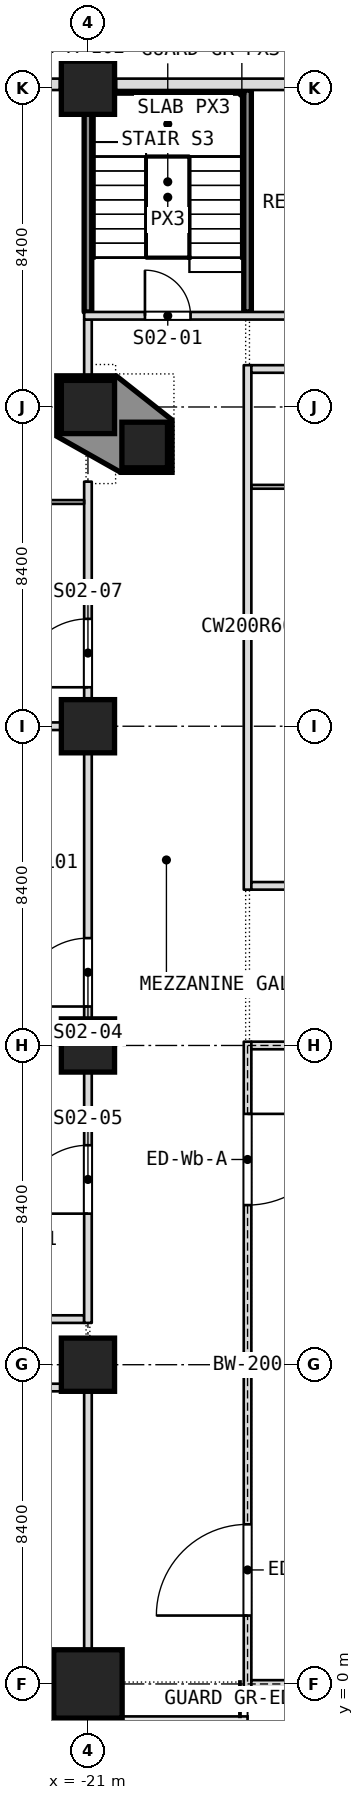
"""IFC4 building model, lengths in metres.
Left out: names, types, materials, properties, quantities, classifications, styles, units other than length and angle.
Written with IfcOpenShell. Run it as: python <this file> out.ifc"""

import sys

from ifc_helpers import new_model, si_unit, direction, frame, frame_2d, origin, origin_2d, place, context, subcontext, project, spatial, polyline, rectangle, outline, extrude, element, fill, save


model = new_model("IFC4")
c1 = context("Model", 3, precision=1e-05, world=origin(), true_north=direction((0.0, 1.0)))
c2 = subcontext(c1, "Body", "Model", "MODEL_VIEW")
j1 = project(units=[si_unit("LENGTHUNIT", "METRE"), si_unit("PLANEANGLEUNIT", "RADIAN")], contexts=[c1])
p1 = place(None, origin())
s1 = spatial("IfcSite", under=j1, at=p1, CompositionType="ELEMENT")
p2 = place(p1, origin())
s2 = spatial("IfcBuilding", under=s1, at=p2, CompositionType="ELEMENT")
p3 = place(p2, frame((0.0, 0.0, 8.0)))
s3 = spatial("IfcBuildingStorey", under=s2, at=p3, CompositionType="ELEMENT", Elevation=8.0)
p4 = place(p3, frame((-21.0, 0.0, 0.0), z_axis=(0.0, 0.0, 1.0), x_axis=(1.0, 0.0, 0.0)))
e1 = element("IfcColumn", 1, at=p4, inside=s3, PredefinedType="COLUMN", context=c2, shape_type="SweptSolid", body=[
    extrude(rectangle(XDim=1.8, YDim=1.8, at=origin_2d()), origin(), (0.0, 0.0, 1.0), 5.0),
])
for number, where, z_axis, x_axis in (
    (2, (-21.0, 8.4, 0.0), (0.0, 0.0, 1.0), (1.0, 0.0, 0.0)),
    (3, (-21.0, 16.8, 0.0), (0.0, 0.0, 1.0), (1.0, 0.0, 0.0)),
    (4, (-21.0, 25.2, 0.0), (0.0, 0.0, 1.0), (1.0, 0.0, 0.0)),
    (5, (-21.0, 33.6, 0.0), (0.0, 0.0, 1.0), (1.0, 0.0, 0.0)),
    (6, (-21.0, 42.0, 0.0), (0.0, 0.0, 1.0), (1.0, 0.0, 0.0)),
):
    element("IfcColumn", number, at=place(p3, frame(where, z_axis=z_axis, x_axis=x_axis)), inside=s3, PredefinedType="COLUMN", context=c2, shape_type="SweptSolid", body=[
        extrude(rectangle(XDim=1.4, YDim=1.4, at=origin_2d()), origin(), (0.0, 0.0, 1.0), 5.0),
    ])
p5 = place(p3, frame((-19.507, 32.6, 0.0), z_axis=(0.0, 0.0, 1.0), x_axis=(1.0, 0.0, 0.0)))
e7 = element("IfcColumn", 7, at=p5, inside=s3, PredefinedType="COLUMN", context=c2, shape_type="SweptSolid", body=[
    extrude(rectangle(XDim=1.2, YDim=1.2, at=origin_2d()), origin(), (0.0, 0.0, 1.0), 5.0),
])
p6 = place(p3, frame((-38.1, 7.8, 0.0), z_axis=(0.0, 0.0, 1.0), x_axis=(1.0, 0.0, 0.0)))
e8 = element("IfcWall", 8, at=p6, inside=s3, PredefinedType="PARTITIONING", context=c2, shape_type="SweptSolid", body=[
    extrude(rectangle(XDim=17.0, YDim=0.2, at=frame_2d((8.5, 0.0))), origin(), (0.0, 0.0, 1.0), 4.68),
])
p7 = place(p6, frame((6.5, 0.0, 0.0)))
e9 = element("IfcOpeningElement", 9, at=p7, cuts=e8, PredefinedType="OPENING", context=c2, shape_type="SweptSolid", body=[
    extrude(rectangle(XDim=1.8, YDim=2.1, at=frame_2d((0.9, 1.05))), frame((0.0, 0.1, 0.0), z_axis=(0.0, -1.0, 0.0), x_axis=(1.0, 0.0, 0.0)), (0.0, 0.0, 1.0), 0.2),
])
p8 = place(p3, frame((-27.3, 9.6, 0.0), z_axis=(0.0, 0.0, 1.0), x_axis=(1.0, 0.0, 0.0)))
e10 = element("IfcWall", 10, at=p8, inside=s3, PredefinedType="PARTITIONING", context=c2, shape_type="SweptSolid", body=[
    extrude(rectangle(XDim=6.2, YDim=0.2, at=frame_2d((3.1, 0.0))), origin(), (0.0, 0.0, 1.0), 4.68),
])
p9 = place(p3, frame((-16.8, 20.9, 0.0), z_axis=(0.0, 0.0, 1.0), x_axis=(0.0, 1.0, 0.0)))
e11 = element("IfcWall", 11, at=p9, inside=s3, PredefinedType="PARTITIONING", context=c2, shape_type="SweptSolid", body=[
    extrude(rectangle(XDim=13.8, YDim=0.2, at=frame_2d((6.9, 0.0))), origin(), (0.0, 0.0, 1.0), 4.68),
])
p10 = place(p3, frame((-16.8, 36.1, 0.0), z_axis=(0.0, 0.0, 1.0), x_axis=(0.0, 1.0, 0.0)))
e12 = element("IfcWall", 12, at=p10, inside=s3, PredefinedType="PARTITIONING", context=c2, shape_type="SweptSolid", body=[
    extrude(rectangle(XDim=5.84, YDim=0.2, at=frame_2d((2.92, 0.0))), origin(), (0.0, 0.0, 1.0), 4.68),
])
p11 = place(p3, frame((-27.66, 17.0, 0.0), z_axis=(0.0, 0.0, 1.0), x_axis=(1.0, 0.0, 0.0)))
e13 = element("IfcWall", 13, at=p11, inside=s3, PredefinedType="PARTITIONING", context=c2, shape_type="SweptSolid", body=[
    extrude(rectangle(XDim=6.56, YDim=0.1, at=frame_2d((3.28, 0.0))), origin(), (0.0, 0.0, 1.0), 4.68),
])
p12 = place(p11, frame((2.38, 0.0, 0.0)))
e14 = element("IfcOpeningElement", 14, at=p12, cuts=e13, PredefinedType="OPENING", context=c2, shape_type="SweptSolid", body=[
    extrude(rectangle(XDim=1.8, YDim=2.1, at=frame_2d((0.9, 1.05))), frame((0.0, 0.05, 0.0), z_axis=(0.0, -1.0, 0.0), x_axis=(1.0, 0.0, 0.0)), (0.0, 0.0, 1.0), 0.1),
])
p13 = place(p3, frame((-21.0, -0.894, 0.0), z_axis=(0.0, 0.0, 1.0), x_axis=(0.0, 1.0, 0.0)))
e15 = element("IfcWall", 15, at=p13, inside=s3, PredefinedType="PARTITIONING", context=c2, shape_type="SweptSolid", body=[
    extrude(rectangle(XDim=8.794, YDim=0.2, at=frame_2d((4.397, 0.0))), origin(), (0.0, 0.0, 1.0), 4.68),
])
p14 = place(p3, frame((-21.0, 9.5, 0.0), z_axis=(0.0, 0.0, 1.0), x_axis=(0.0, 1.0, 0.0)))
e16 = element("IfcWall", 16, at=p14, inside=s3, PredefinedType="PARTITIONING", context=c2, shape_type="SweptSolid", body=[
    extrude(rectangle(XDim=22.135, YDim=0.2, at=frame_2d((11.067, 0.0))), origin(), (0.0, 0.0, 1.0), 4.68),
])
p15 = place(p14, frame((8.325, 0.0, 0.0)))
e17 = element("IfcOpeningElement", 17, at=p15, cuts=e16, PredefinedType="OPENING", context=c2, shape_type="SweptSolid", body=[
    extrude(rectangle(XDim=1.8, YDim=2.1, at=frame_2d((0.9, 1.05))), frame((0.0, 0.1, 0.0), z_axis=(0.0, -1.0, 0.0), x_axis=(1.0, 0.0, 0.0)), (0.0, 0.0, 1.0), 0.2),
])
p16 = place(p14, frame((2.875, 0.0, 0.0)))
e18 = element("IfcOpeningElement", 18, at=p16, cuts=e16, PredefinedType="OPENING", context=c2, shape_type="SweptSolid", body=[
    extrude(rectangle(XDim=1.8, YDim=2.1, at=frame_2d((0.9, 1.05))), frame((0.0, 0.1, 0.0), z_axis=(0.0, -1.0, 0.0), x_axis=(1.0, 0.0, 0.0)), (0.0, 0.0, 1.0), 0.2),
])
p17 = place(p14, frame((16.725, 0.0, 0.0)))
e19 = element("IfcOpeningElement", 19, at=p17, cuts=e16, PredefinedType="OPENING", context=c2, shape_type="SweptSolid", body=[
    extrude(rectangle(XDim=1.8, YDim=2.1, at=frame_2d((0.9, 1.05))), frame((0.0, 0.1, 0.0), z_axis=(0.0, -1.0, 0.0), x_axis=(1.0, 0.0, 0.0)), (0.0, 0.0, 1.0), 0.2),
])
p18 = place(p3, frame((-21.0, 34.42, 0.0), z_axis=(0.0, 0.0, 1.0), x_axis=(0.0, 1.0, 0.0)))
e20 = element("IfcWall", 20, at=p18, inside=s3, PredefinedType="PARTITIONING", context=c2, shape_type="SweptSolid", body=[
    extrude(rectangle(XDim=1.48, YDim=0.2, at=frame_2d((0.74, 0.0))), origin(), (0.0, 0.0, 1.0), 4.68),
])
p19 = place(p3, frame((-21.0, 36.1, 0.0), z_axis=(0.0, 0.0, 1.0), x_axis=(0.0, 1.0, 0.0)))
e21 = element("IfcWall", 21, at=p19, inside=s3, PredefinedType="PARTITIONING", context=c2, shape_type="SweptSolid", body=[
    extrude(rectangle(XDim=6.2, YDim=0.2, at=frame_2d((3.1, 0.0))), origin(), (0.0, 0.0, 1.0), 4.68),
])
p20 = place(p3, frame((-16.7, 21.0, 0.0), z_axis=(0.0, 0.0, 1.0), x_axis=(1.0, 0.0, 0.0)))
e22 = element("IfcWall", 22, at=p20, inside=s3, PredefinedType="PARTITIONING", context=c2, shape_type="SweptSolid", body=[
    extrude(rectangle(XDim=33.4, YDim=0.2, at=frame_2d((16.7, 0.0))), origin(), (0.0, 0.0, 1.0), 4.68),
])
p21 = place(p20, frame((7.425, 0.0, 0.0)))
e23 = element("IfcOpeningElement", 23, at=p21, cuts=e22, PredefinedType="OPENING", context=c2, shape_type="SweptSolid", body=[
    extrude(rectangle(XDim=1.8, YDim=2.1, at=frame_2d((0.9, 1.05))), frame((0.0, 0.1, 0.0), z_axis=(0.0, -1.0, 0.0), x_axis=(1.0, 0.0, 0.0)), (0.0, 0.0, 1.0), 0.2),
])
p22 = place(p20, frame((1.175, 0.0, 0.0)))
e24 = element("IfcOpeningElement", 24, at=p22, cuts=e22, PredefinedType="OPENING", context=c2, shape_type="SweptSolid", body=[
    extrude(rectangle(XDim=1.8, YDim=2.1, at=frame_2d((0.9, 1.05))), frame((0.0, 0.1, 0.0), z_axis=(0.0, -1.0, 0.0), x_axis=(1.0, 0.0, 0.0)), (0.0, 0.0, 1.0), 0.2),
])
p23 = place(p20, frame((15.8, 0.0, 0.0)))
e25 = element("IfcOpeningElement", 25, at=p23, cuts=e22, PredefinedType="OPENING", context=c2, shape_type="SweptSolid", body=[
    extrude(rectangle(XDim=1.8, YDim=2.1, at=frame_2d((0.9, 1.05))), frame((0.0, 0.1, 0.0), z_axis=(0.0, -1.0, 0.0), x_axis=(1.0, 0.0, 0.0)), (0.0, 0.0, 1.0), 0.2),
])
p24 = place(p20, frame((26.2, 0.0, 0.0)))
e26 = element("IfcOpeningElement", 26, at=p24, cuts=e22, PredefinedType="OPENING", context=c2, shape_type="SweptSolid", body=[
    extrude(rectangle(XDim=1.8, YDim=2.1, at=frame_2d((0.9, 1.05))), frame((0.0, 0.1, 0.0), z_axis=(0.0, -1.0, 0.0), x_axis=(1.0, 0.0, 0.0)), (0.0, 0.0, 1.0), 0.2),
])
p25 = place(p3, frame((-27.68, 25.2, 0.0), z_axis=(0.0, 0.0, 1.0), x_axis=(1.0, 0.0, 0.0)))
e27 = element("IfcWall", 27, at=p25, inside=s3, PredefinedType="PARTITIONING", context=c2, shape_type="SweptSolid", body=[
    extrude(rectangle(XDim=6.58, YDim=0.2, at=frame_2d((3.29, 0.0))), origin(), (0.0, 0.0, 1.0), 4.68),
])
p26 = place(p3, frame((-25.816, 31.1, 0.0), z_axis=(0.0, 0.0, 1.0), x_axis=(1.0, 0.0, 0.0)))
e28 = element("IfcWall", 28, at=p26, inside=s3, PredefinedType="PARTITIONING", context=c2, shape_type="SweptSolid", body=[
    extrude(rectangle(XDim=4.716, YDim=0.1, at=frame_2d((2.358, 0.0))), origin(), (0.0, 0.0, 1.0), 4.68),
])
p27 = place(p26, frame((0.308, 0.0, 0.0)))
e29 = element("IfcOpeningElement", 29, at=p27, cuts=e28, PredefinedType="OPENING", context=c2, shape_type="SweptSolid", body=[
    extrude(rectangle(XDim=1.8, YDim=2.1, at=frame_2d((0.9, 1.05))), frame((0.0, 0.05, 0.0), z_axis=(0.0, -1.0, 0.0), x_axis=(1.0, 0.0, 0.0)), (0.0, 0.0, 1.0), 0.1),
])
p28 = place(p3, frame((-16.7, 31.5, 0.0), z_axis=(0.0, 0.0, 1.0), x_axis=(1.0, 0.0, 0.0)))
e30 = element("IfcWall", 30, at=p28, inside=s3, PredefinedType="PARTITIONING", context=c2, shape_type="SweptSolid", body=[
    extrude(rectangle(XDim=12.4, YDim=0.1, at=frame_2d((6.2, 0.0))), origin(), (0.0, 0.0, 1.0), 4.68),
])
p29 = place(p28, frame((5.9, 0.0, 0.0)))
e31 = element("IfcOpeningElement", 31, at=p29, cuts=e30, PredefinedType="OPENING", context=c2, shape_type="SweptSolid", body=[
    extrude(rectangle(XDim=1.0, YDim=2.1, at=frame_2d((0.5, 1.05))), frame((0.0, 0.05, 0.0), z_axis=(0.0, -1.0, 0.0), x_axis=(1.0, 0.0, 0.0)), (0.0, 0.0, 1.0), 0.1),
])
p30 = place(p3, frame((-16.7, 34.6, 0.0), z_axis=(0.0, 0.0, 1.0), x_axis=(1.0, 0.0, 0.0)))
e32 = element("IfcWall", 32, at=p30, inside=s3, PredefinedType="PARTITIONING", context=c2, shape_type="SweptSolid", body=[
    extrude(rectangle(XDim=3.23, YDim=0.2, at=frame_2d((1.615, 0.0))), origin(), (0.0, 0.0, 1.0), 4.68),
])
p31 = place(p3, frame((-21.1, 36.0, 0.0), z_axis=(0.0, 0.0, 1.0), x_axis=(1.0, 0.0, 0.0)))
e33 = element("IfcWall", 33, at=p31, inside=s3, PredefinedType="PARTITIONING", context=c2, shape_type="SweptSolid", body=[
    extrude(rectangle(XDim=23.3, YDim=0.2, at=frame_2d((11.65, 0.0))), origin(), (0.0, 0.0, 1.0), 4.68),
])
p32 = place(p31, frame((1.6, 0.0, 0.0)))
e34 = element("IfcOpeningElement", 34, at=p32, cuts=e33, PredefinedType="OPENING", context=c2, shape_type="SweptSolid", body=[
    extrude(rectangle(XDim=1.2, YDim=2.1, at=frame_2d((0.6, 1.05))), frame((0.0, 0.1, 0.0), z_axis=(0.0, -1.0, 0.0), x_axis=(1.0, 0.0, 0.0)), (0.0, 0.0, 1.0), 0.2),
])
p33 = place(p31, frame((11.15, 0.0, 0.0)))
e35 = element("IfcOpeningElement", 35, at=p33, cuts=e33, PredefinedType="OPENING", context=c2, shape_type="SweptSolid", body=[
    extrude(rectangle(XDim=1.0, YDim=2.1, at=frame_2d((0.5, 1.05))), frame((0.0, 0.1, 0.0), z_axis=(0.0, -1.0, 0.0), x_axis=(1.0, 0.0, 0.0)), (0.0, 0.0, 1.0), 0.2),
])
p34 = place(p31, frame((10.05, 0.0, 0.0)))
e36 = element("IfcOpeningElement", 36, at=p34, cuts=e33, PredefinedType="OPENING", context=c2, shape_type="SweptSolid", body=[
    extrude(rectangle(XDim=1.0, YDim=2.1, at=frame_2d((0.5, 1.05))), frame((0.0, 0.1, 0.0), z_axis=(0.0, -1.0, 0.0), x_axis=(1.0, 0.0, 0.0)), (0.0, 0.0, 1.0), 0.2),
])
p35 = place(p31, frame((20.5, 0.0, 0.0)))
e37 = element("IfcOpeningElement", 37, at=p35, cuts=e33, PredefinedType="OPENING", context=c2, shape_type="SweptSolid", body=[
    extrude(rectangle(XDim=1.2, YDim=2.1, at=frame_2d((0.6, 1.05))), frame((0.0, 0.1, 0.0), z_axis=(0.0, -1.0, 0.0), x_axis=(1.0, 0.0, 0.0)), (0.0, 0.0, 1.0), 0.2),
])
for number, where, z_axis, x_axis in (
    (38, (-13.34, 42.09, 0.0), (0.0, 0.0, 1.0), (-1.0, 0.0, 0.0)),
    (39, (-21.74, 42.09, 0.0), (0.0, 0.0, 1.0), (-1.0, 0.0, 0.0)),
):
    element("IfcWall", number, at=place(p3, frame(where, z_axis=z_axis, x_axis=x_axis)), inside=s3, PredefinedType="NOTDEFINED", context=c2, shape_type="SweptSolid", body=[
        extrude(rectangle(XDim=6.92, YDim=0.3, at=frame_2d((3.46, 0.0))), origin(), (0.0, 0.0, 1.0), 3.78),
    ])
p36 = place(p3, frame((-16.8, -0.1, 0.0), z_axis=(0.0, 0.0, 1.0), x_axis=(0.0, 1.0, 0.0)))
e40 = element("IfcWall", 40, at=p36, inside=s3, PredefinedType="PARTITIONING", context=c2, shape_type="SweptSolid", body=[
    extrude(rectangle(XDim=17.0, YDim=0.2, at=frame_2d((8.5, 0.0))), origin(), (0.0, 0.0, 1.0), 4.78),
])
p37 = place(p36, frame((1.9, 0.0, 0.0)))
e41 = element("IfcOpeningElement", 41, at=p37, cuts=e40, PredefinedType="OPENING", context=c2, shape_type="SweptSolid", body=[
    extrude(rectangle(XDim=2.4, YDim=2.1, at=frame_2d((1.2, 1.05))), frame((0.0, 0.1, 0.0), z_axis=(0.0, -1.0, 0.0), x_axis=(1.0, 0.0, 0.0)), (0.0, 0.0, 1.0), 0.2),
])
p38 = place(p36, frame((12.7, 0.0, 0.0)))
e42 = element("IfcOpeningElement", 42, at=p38, cuts=e40, PredefinedType="OPENING", context=c2, shape_type="SweptSolid", body=[
    extrude(rectangle(XDim=2.4, YDim=2.1, at=frame_2d((1.2, 1.05))), frame((0.0, 0.1, 0.0), z_axis=(0.0, -1.0, 0.0), x_axis=(1.0, 0.0, 0.0)), (0.0, 0.0, 1.0), 0.2),
])
for number, where, z_axis, x_axis in (
    (43, (-16.7, 0.0, 0.0), (0.0, 0.0, 1.0), (1.0, 0.0, 0.0)),
    (44, (-16.7, 16.8, 0.0), (0.0, 0.0, 1.0), (1.0, 0.0, 0.0)),
):
    element("IfcWall", number, at=place(p3, frame(where, z_axis=z_axis, x_axis=x_axis)), inside=s3, PredefinedType="PARTITIONING", context=c2, shape_type="SweptSolid", body=[
        extrude(rectangle(XDim=4.1, YDim=0.2, at=frame_2d((2.05, 0.0))), origin(), (0.0, 0.0, 1.0), 4.78),
    ])
p39 = place(p3, origin())
e45 = element("IfcWall", 45, at=p39, inside=s3, PredefinedType="SOLIDWALL", context=c2, shape_type="SweptSolid", body=[
    extrude(outline(polyline([(-21.82, 34.42), (-20.258, 34.42), (-18.787, 33.258), (-18.787, 31.88), (-20.138, 31.88), (-21.82, 32.83), (-21.82, 34.42)]), holes=[polyline([(-18.907, 32.0), (-18.907, 33.2), (-20.107, 33.2), (-20.107, 32.0), (-18.907, 32.0)]), polyline([(-20.3, 32.9), (-20.3, 34.3), (-21.7, 34.3), (-21.7, 32.9), (-20.3, 32.9)])]), origin(), (0.0, 0.0, 1.0), 5.0),
])
p40 = place(p15, origin())
e46 = element("IfcDoor", 46, at=p40, inside=s3, OperationType="DOUBLE_DOOR_SINGLE_SWING", PredefinedType="DOOR", context=c2, shape_type="SweptSolid", body=[
    extrude(rectangle(XDim=1.8, YDim=2.1, at=frame_2d((0.9, 1.05))), frame((0.0, 0.025, 0.0), z_axis=(0.0, -1.0, 0.0), x_axis=(1.0, 0.0, 0.0)), (0.0, 0.0, 1.0), 0.05),
])
fill(e17, e46)
p41 = place(p16, origin())
e47 = element("IfcDoor", 47, at=p41, inside=s3, OperationType="DOUBLE_DOOR_SINGLE_SWING", PredefinedType="DOOR", context=c2, shape_type="SweptSolid", body=[
    extrude(rectangle(XDim=1.8, YDim=2.1, at=frame_2d((0.9, 1.05))), frame((0.0, 0.025, 0.0), z_axis=(0.0, -1.0, 0.0), x_axis=(1.0, 0.0, 0.0)), (0.0, 0.0, 1.0), 0.05),
])
fill(e18, e47)
p42 = place(p17, origin())
e48 = element("IfcDoor", 48, at=p42, inside=s3, OperationType="DOUBLE_DOOR_SINGLE_SWING", PredefinedType="DOOR", context=c2, shape_type="SweptSolid", body=[
    extrude(rectangle(XDim=1.8, YDim=2.1, at=frame_2d((0.9, 1.05))), frame((0.0, 0.025, 0.0), z_axis=(0.0, -1.0, 0.0), x_axis=(1.0, 0.0, 0.0)), (0.0, 0.0, 1.0), 0.05),
])
fill(e19, e48)
p43 = place(p32, origin())
e49 = element("IfcDoor", 49, at=p43, inside=s3, OperationType="SINGLE_SWING_RIGHT", PredefinedType="DOOR", context=c2, shape_type="SweptSolid", body=[
    extrude(rectangle(XDim=1.2, YDim=2.1, at=frame_2d((0.6, 1.05))), frame((0.0, 0.025, 0.0), z_axis=(0.0, -1.0, 0.0), x_axis=(1.0, 0.0, 0.0)), (0.0, 0.0, 1.0), 0.05),
])
fill(e34, e49)
p44 = place(p37, origin())
e50 = element("IfcDoor", 50, at=p44, inside=s3, OperationType="DOUBLE_DOOR_SINGLE_SWING", PredefinedType="DOOR", context=c2, shape_type="SweptSolid", body=[
    extrude(rectangle(XDim=2.4, YDim=2.1, at=frame_2d((1.2, 1.05))), frame((0.0, 0.025, 0.0), z_axis=(0.0, -1.0, 0.0), x_axis=(1.0, 0.0, 0.0)), (0.0, 0.0, 1.0), 0.05),
])
fill(e41, e50)
p45 = place(p38, origin())
e51 = element("IfcDoor", 51, at=p45, inside=s3, OperationType="DOUBLE_DOOR_SINGLE_SWING", PredefinedType="DOOR", context=c2, shape_type="SweptSolid", body=[
    extrude(rectangle(XDim=2.4, YDim=2.1, at=frame_2d((1.2, 1.05))), frame((0.0, 0.025, 0.0), z_axis=(0.0, -1.0, 0.0), x_axis=(1.0, 0.0, 0.0)), (0.0, 0.0, 1.0), 0.05),
])
fill(e42, e51)
save(model, sys.argv[1])
